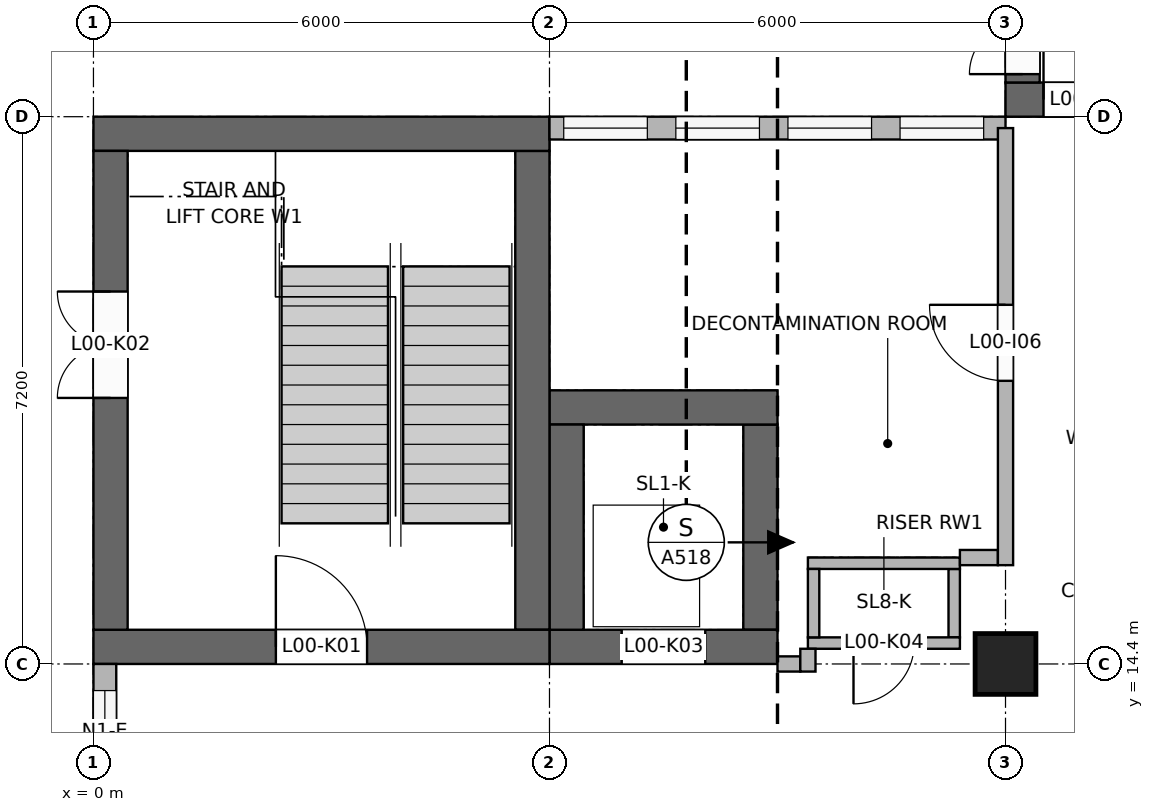
"""IFC4 building model, lengths in metres.
Left out: names, types, materials, properties, quantities, classifications, styles, units other than length and angle.
Written with IfcOpenShell. Run it as: python <this file> out.ifc"""

import sys

from ifc_helpers import new_model, si_unit, direction, frame, frame_2d, origin, origin_2d, place, context, subcontext, project, spatial, rectangle, extrude, element, fill, save


model = new_model("IFC4")
c1 = context("Model", 3, precision=1e-05, world=origin(), true_north=direction((0.0, 1.0)))
c2 = subcontext(c1, "Body", "Model", "MODEL_VIEW")
j1 = project(units=[si_unit("LENGTHUNIT", "METRE"), si_unit("PLANEANGLEUNIT", "RADIAN")], contexts=[c1])
p1 = place(None, origin())
s1 = spatial("IfcSite", under=j1, at=p1, CompositionType="ELEMENT")
p2 = place(p1, origin())
s2 = spatial("IfcBuilding", under=s1, at=p2, CompositionType="ELEMENT")
p3 = place(p2, origin())
s3 = spatial("IfcBuildingStorey", under=s2, at=p3, CompositionType="ELEMENT", Elevation=0.0)
p4 = place(p3, frame((0.0, 14.625, 0.0), z_axis=(0.0, 0.0, 1.0), x_axis=(1.0, 0.0, 0.0)))
e1 = element("IfcWall", 1, at=p4, inside=s3, PredefinedType="SHEAR", context=c2, shape_type="SweptSolid", body=[
    extrude(rectangle(XDim=6.0, YDim=0.45, at=frame_2d((3.0, 0.0))), origin(), (0.0, 0.0, 1.0), 4.0),
])
p5 = place(p4, frame((2.4, 0.0, 0.0)))
e2 = element("IfcOpeningElement", 2, at=p5, cuts=e1, PredefinedType="OPENING", context=c2, shape_type="SweptSolid", body=[
    extrude(rectangle(XDim=1.2, YDim=2.1, at=frame_2d((0.6, 1.05))), frame((0.0, 0.235, 0.0), z_axis=(0.0, -1.0, 0.0), x_axis=(1.0, 0.0, 0.0)), (0.0, 0.0, 1.0), 0.47),
])
p6 = place(p3, frame((0.0, 21.375, 0.0), z_axis=(0.0, 0.0, 1.0), x_axis=(1.0, 0.0, 0.0)))
e3 = element("IfcWall", 3, at=p6, inside=s3, PredefinedType="SHEAR", context=c2, shape_type="SweptSolid", body=[
    extrude(rectangle(XDim=6.0, YDim=0.45, at=frame_2d((3.0, 0.0))), origin(), (0.0, 0.0, 1.0), 4.0),
])
p7 = place(p3, frame((0.225, 14.85, 0.0), z_axis=(0.0, 0.0, 1.0), x_axis=(0.0, 1.0, 0.0)))
e4 = element("IfcWall", 4, at=p7, inside=s3, PredefinedType="SHEAR", context=c2, shape_type="SweptSolid", body=[
    extrude(rectangle(XDim=6.3, YDim=0.45, at=frame_2d((3.15, 0.0))), origin(), (0.0, 0.0, 1.0), 4.0),
])
p8 = place(p7, frame((3.05, 0.0, 0.0)))
e5 = element("IfcOpeningElement", 5, at=p8, cuts=e4, PredefinedType="OPENING", context=c2, shape_type="SweptSolid", body=[
    extrude(rectangle(XDim=1.4, YDim=2.1, at=frame_2d((0.7, 1.05))), frame((0.0, 0.235, 0.0), z_axis=(0.0, -1.0, 0.0), x_axis=(1.0, 0.0, 0.0)), (0.0, 0.0, 1.0), 0.47),
])
p9 = place(p3, frame((5.775, 14.85, 0.0), z_axis=(0.0, 0.0, 1.0), x_axis=(0.0, 1.0, 0.0)))
e6 = element("IfcWall", 6, at=p9, inside=s3, PredefinedType="SHEAR", context=c2, shape_type="SweptSolid", body=[
    extrude(rectangle(XDim=6.3, YDim=0.45, at=frame_2d((3.15, 0.0))), origin(), (0.0, 0.0, 1.0), 4.0),
])
p10 = place(p3, frame((6.0, 14.625, 0.0), z_axis=(0.0, 0.0, 1.0), x_axis=(1.0, 0.0, 0.0)))
e7 = element("IfcWall", 7, at=p10, inside=s3, PredefinedType="SHEAR", context=c2, shape_type="SweptSolid", body=[
    extrude(rectangle(XDim=3.0, YDim=0.45, at=frame_2d((1.5, 0.0))), origin(), (0.0, 0.0, 1.0), 4.2),
])
p11 = place(p10, frame((0.95, 0.0, 0.0)))
e8 = element("IfcOpeningElement", 8, at=p11, cuts=e7, PredefinedType="OPENING", context=c2, shape_type="SweptSolid", body=[
    extrude(rectangle(XDim=1.1, YDim=2.1, at=frame_2d((0.55, 1.05))), frame((0.0, 0.235, 0.0), z_axis=(0.0, -1.0, 0.0), x_axis=(1.0, 0.0, 0.0)), (0.0, 0.0, 1.0), 0.47),
])
p12 = place(p3, frame((6.0, 17.775, 0.0), z_axis=(0.0, 0.0, 1.0), x_axis=(1.0, 0.0, 0.0)))
e9 = element("IfcWall", 9, at=p12, inside=s3, PredefinedType="SHEAR", context=c2, shape_type="SweptSolid", body=[
    extrude(rectangle(XDim=3.0, YDim=0.45, at=frame_2d((1.5, 0.0))), origin(), (0.0, 0.0, 1.0), 4.2),
])
p13 = place(p3, frame((8.775, 14.85, 0.0), z_axis=(0.0, 0.0, 1.0), x_axis=(0.0, 1.0, 0.0)))
e10 = element("IfcWall", 10, at=p13, inside=s3, PredefinedType="SHEAR", context=c2, shape_type="SweptSolid", body=[
    extrude(rectangle(XDim=2.7, YDim=0.45, at=frame_2d((1.35, 0.0))), origin(), (0.0, 0.0, 1.0), 4.2),
])
for number, where, z_axis, x_axis in (
    (11, (6.0, 14.625, -1.7), (0.0, 0.0, 1.0), (1.0, 0.0, 0.0)),
    (12, (6.0, 17.775, -1.7), (0.0, 0.0, 1.0), (1.0, 0.0, 0.0)),
):
    element("IfcWall", number, at=place(p3, frame(where, z_axis=z_axis, x_axis=x_axis)), inside=s3, PredefinedType="SHEAR", context=c2, shape_type="SweptSolid", body=[
        extrude(rectangle(XDim=3.0, YDim=0.45, at=frame_2d((1.5, 0.0))), origin(), (0.0, 0.0, 1.0), 1.7),
    ])
for number, where, z_axis, x_axis in (
    (13, (6.225, 14.85, -1.7), (0.0, 0.0, 1.0), (0.0, 1.0, 0.0)),
    (14, (8.775, 14.85, -1.7), (0.0, 0.0, 1.0), (0.0, 1.0, 0.0)),
):
    element("IfcWall", number, at=place(p3, frame(where, z_axis=z_axis, x_axis=x_axis)), inside=s3, PredefinedType="SHEAR", context=c2, shape_type="SweptSolid", body=[
        extrude(rectangle(XDim=2.7, YDim=0.45, at=frame_2d((1.35, 0.0))), origin(), (0.0, 0.0, 1.0), 1.7),
    ])
p14 = place(p3, frame((12.0, 21.825, 0.0), z_axis=(0.0, 0.0, 1.0), x_axis=(1.0, 0.0, 0.0)))
e15 = element("IfcWall", 15, at=p14, inside=s3, PredefinedType="SHEAR", context=c2, shape_type="SweptSolid", body=[
    extrude(rectangle(XDim=5.4, YDim=0.45, at=frame_2d((2.7, 0.0))), origin(), (0.0, 0.0, 1.0), 4.0),
])
p15 = place(p14, frame((0.5, 0.0, 0.0)))
e16 = element("IfcOpeningElement", 16, at=p15, cuts=e15, PredefinedType="OPENING", context=c2, shape_type="SweptSolid", body=[
    extrude(rectangle(XDim=1.2, YDim=2.1, at=frame_2d((0.6, 1.05))), frame((0.0, 0.235, 0.0), z_axis=(0.0, -1.0, 0.0), x_axis=(1.0, 0.0, 0.0)), (0.0, 0.0, 1.0), 0.47),
])
p16 = place(p3, frame((12.225, 22.05, 0.0), z_axis=(0.0, 0.0, 1.0), x_axis=(0.0, 1.0, 0.0)))
e17 = element("IfcWall", 17, at=p16, inside=s3, PredefinedType="SHEAR", context=c2, shape_type="SweptSolid", body=[
    extrude(rectangle(XDim=6.3, YDim=0.45, at=frame_2d((3.15, 0.0))), origin(), (0.0, 0.0, 1.0), 4.0),
])
p17 = place(p16, frame((0.11, 0.0, 0.0)))
e18 = element("IfcOpeningElement", 18, at=p17, cuts=e17, PredefinedType="OPENING", context=c2, shape_type="SweptSolid", body=[
    extrude(rectangle(XDim=1.4, YDim=2.1, at=frame_2d((0.7, 1.05))), frame((0.0, 0.235, 0.0), z_axis=(0.0, -1.0, 0.0), x_axis=(1.0, 0.0, 0.0)), (0.0, 0.0, 1.0), 0.47),
])
p18 = place(p3, frame((9.4, 14.675, 0.0), z_axis=(0.0, 0.0, 1.0), x_axis=(1.0, 0.0, 0.0)))
e19 = element("IfcWall", 19, at=p18, inside=s3, PredefinedType="SOLIDWALL", context=c2, shape_type="SweptSolid", body=[
    extrude(rectangle(XDim=2.0, YDim=0.15, at=frame_2d((1.0, 0.0))), origin(), (0.0, 0.0, 1.0), 4.2),
])
p19 = place(p18, frame((0.6, 0.0, 0.0)))
e20 = element("IfcOpeningElement", 20, at=p19, cuts=e19, PredefinedType="OPENING", context=c2, shape_type="SweptSolid", body=[
    extrude(rectangle(XDim=0.8, YDim=2.1, at=frame_2d((0.4, 1.05))), frame((0.0, 0.085, 0.0), z_axis=(0.0, -1.0, 0.0), x_axis=(1.0, 0.0, 0.0)), (0.0, 0.0, 1.0), 0.17),
])
p20 = place(p3, frame((9.4, 15.725, 0.0), z_axis=(0.0, 0.0, 1.0), x_axis=(1.0, 0.0, 0.0)))
e21 = element("IfcWall", 21, at=p20, inside=s3, PredefinedType="SOLIDWALL", context=c2, shape_type="SweptSolid", body=[
    extrude(rectangle(XDim=2.0, YDim=0.15, at=frame_2d((1.0, 0.0))), origin(), (0.0, 0.0, 1.0), 4.2),
])
for number, where, z_axis, x_axis in (
    (22, (9.475, 14.75, 0.0), (0.0, 0.0, 1.0), (0.0, 1.0, 0.0)),
    (23, (11.325, 14.75, 0.0), (0.0, 0.0, 1.0), (0.0, 1.0, 0.0)),
):
    element("IfcWall", number, at=place(p3, frame(where, z_axis=z_axis, x_axis=x_axis)), inside=s3, PredefinedType="SOLIDWALL", context=c2, shape_type="SweptSolid", body=[
        extrude(rectangle(XDim=0.9, YDim=0.15, at=frame_2d((0.45, 0.0))), origin(), (0.0, 0.0, 1.0), 4.2),
    ])
p21 = place(p3, frame((12.0, 14.4, -0.25), z_axis=(0.0, 0.0, 1.0), x_axis=(1.0, 0.0, 0.0)))
e24 = element("IfcColumn", 24, at=p21, inside=s3, PredefinedType="COLUMN", context=c2, shape_type="SweptSolid", body=[
    extrude(rectangle(XDim=0.8, YDim=0.8, at=origin_2d()), origin(), (0.0, 0.0, 1.0), 4.25),
])
p22 = place(p3, frame((0.15, 7.6, 0.0), z_axis=(0.0, 0.0, 1.0), x_axis=(0.0, 1.0, 0.0)))
e25 = element("IfcWall", 25, at=p22, inside=s3, PredefinedType="SOLIDWALL", context=c2, shape_type="SweptSolid", body=[
    extrude(rectangle(XDim=6.8, YDim=0.3, at=frame_2d((3.4, 0.0))), origin(), (0.0, 0.0, 1.0), 3.1),
])
p23 = place(p22, frame((0.267, 0.0, 0.9)))
e26 = element("IfcOpeningElement", 26, at=p23, cuts=e25, PredefinedType="OPENING", context=c2, shape_type="SweptSolid", body=[
    extrude(rectangle(XDim=1.1, YDim=1.5, at=frame_2d((0.55, 0.75))), frame((0.0, 0.16, 0.0), z_axis=(0.0, -1.0, 0.0), x_axis=(1.0, 0.0, 0.0)), (0.0, 0.0, 1.0), 0.32),
])
p24 = place(p22, frame((1.9, 0.0, 0.9)))
e27 = element("IfcOpeningElement", 27, at=p24, cuts=e25, PredefinedType="OPENING", context=c2, shape_type="SweptSolid", body=[
    extrude(rectangle(XDim=1.1, YDim=1.5, at=frame_2d((0.55, 0.75))), frame((0.0, 0.16, 0.0), z_axis=(0.0, -1.0, 0.0), x_axis=(1.0, 0.0, 0.0)), (0.0, 0.0, 1.0), 0.32),
])
p25 = place(p22, frame((3.533, 0.0, 0.9)))
e28 = element("IfcOpeningElement", 28, at=p25, cuts=e25, PredefinedType="OPENING", context=c2, shape_type="SweptSolid", body=[
    extrude(rectangle(XDim=1.1, YDim=1.5, at=frame_2d((0.55, 0.75))), frame((0.0, 0.16, 0.0), z_axis=(0.0, -1.0, 0.0), x_axis=(1.0, 0.0, 0.0)), (0.0, 0.0, 1.0), 0.32),
])
p26 = place(p22, frame((5.35, 0.0, 0.9)))
e29 = element("IfcOpeningElement", 29, at=p26, cuts=e25, PredefinedType="OPENING", context=c2, shape_type="SweptSolid", body=[
    extrude(rectangle(XDim=1.1, YDim=1.5, at=frame_2d((0.55, 0.75))), frame((0.0, 0.16, 0.0), z_axis=(0.0, -1.0, 0.0), x_axis=(1.0, 0.0, 0.0)), (0.0, 0.0, 1.0), 0.32),
])
p27 = place(p3, frame((6.0, 21.45, 0.0), z_axis=(0.0, 0.0, 1.0), x_axis=(1.0, 0.0, 0.0)))
e30 = element("IfcWall", 30, at=p27, inside=s3, PredefinedType="SOLIDWALL", context=c2, shape_type="SweptSolid", body=[
    extrude(rectangle(XDim=6.0, YDim=0.3, at=frame_2d((3.0, 0.0))), origin(), (0.0, 0.0, 1.0), 3.1),
])
p28 = place(p27, frame((0.188, 0.0, 0.9)))
e31 = element("IfcOpeningElement", 31, at=p28, cuts=e30, PredefinedType="OPENING", context=c2, shape_type="SweptSolid", body=[
    extrude(rectangle(XDim=1.1, YDim=1.5, at=frame_2d((0.55, 0.75))), frame((0.0, 0.16, 0.0), z_axis=(0.0, -1.0, 0.0), x_axis=(1.0, 0.0, 0.0)), (0.0, 0.0, 1.0), 0.32),
])
p29 = place(p27, frame((1.663, 0.0, 0.9)))
e32 = element("IfcOpeningElement", 32, at=p29, cuts=e30, PredefinedType="OPENING", context=c2, shape_type="SweptSolid", body=[
    extrude(rectangle(XDim=1.1, YDim=1.5, at=frame_2d((0.55, 0.75))), frame((0.0, 0.16, 0.0), z_axis=(0.0, -1.0, 0.0), x_axis=(1.0, 0.0, 0.0)), (0.0, 0.0, 1.0), 0.32),
])
p30 = place(p27, frame((3.137, 0.0, 0.9)))
e33 = element("IfcOpeningElement", 33, at=p30, cuts=e30, PredefinedType="OPENING", context=c2, shape_type="SweptSolid", body=[
    extrude(rectangle(XDim=1.1, YDim=1.5, at=frame_2d((0.55, 0.75))), frame((0.0, 0.16, 0.0), z_axis=(0.0, -1.0, 0.0), x_axis=(1.0, 0.0, 0.0)), (0.0, 0.0, 1.0), 0.32),
])
p31 = place(p27, frame((4.613, 0.0, 0.9)))
e34 = element("IfcOpeningElement", 34, at=p31, cuts=e30, PredefinedType="OPENING", context=c2, shape_type="SweptSolid", body=[
    extrude(rectangle(XDim=1.1, YDim=1.5, at=frame_2d((0.55, 0.75))), frame((0.0, 0.16, 0.0), z_axis=(0.0, -1.0, 0.0), x_axis=(1.0, 0.0, 0.0)), (0.0, 0.0, 1.0), 0.32),
])
p32 = place(p3, frame((9.4, 14.3, 0.0), z_axis=(0.0, 0.0, 1.0), x_axis=(0.0, 1.0, 0.0)))
e35 = element("IfcWall", 35, at=p32, inside=s3, PredefinedType="PARTITIONING", context=c2, shape_type="SweptSolid", body=[
    extrude(rectangle(XDim=0.3, YDim=0.2, at=frame_2d((0.15, 0.0))), origin(), (0.0, 0.0, 1.0), 3.2),
])
p33 = place(p3, frame((12.0, 15.7, 0.0), z_axis=(0.0, 0.0, 1.0), x_axis=(0.0, 1.0, 0.0)))
e36 = element("IfcWall", 36, at=p33, inside=s3, PredefinedType="PARTITIONING", context=c2, shape_type="SweptSolid", body=[
    extrude(rectangle(XDim=5.75, YDim=0.2, at=frame_2d((2.875, 0.0))), origin(), (0.0, 0.0, 1.0), 3.1),
])
p34 = place(p33, frame((2.425, 0.0, 0.0)))
e37 = element("IfcOpeningElement", 37, at=p34, cuts=e36, PredefinedType="OPENING", context=c2, shape_type="SweptSolid", body=[
    extrude(rectangle(XDim=1.0, YDim=2.1, at=frame_2d((0.5, 1.05))), frame((0.0, 0.11, 0.0), z_axis=(0.0, -1.0, 0.0), x_axis=(1.0, 0.0, 0.0)), (0.0, 0.0, 1.0), 0.22),
])
p35 = place(p3, frame((9.0, 14.4, 0.0), z_axis=(0.0, 0.0, 1.0), x_axis=(1.0, 0.0, 0.0)))
e38 = element("IfcWall", 38, at=p35, inside=s3, PredefinedType="PARTITIONING", context=c2, shape_type="SweptSolid", body=[
    extrude(rectangle(XDim=0.3, YDim=0.2, at=frame_2d((0.15, 0.0))), origin(), (0.0, 0.0, 1.0), 3.2),
])
p36 = place(p3, frame((11.4, 15.8, 0.0), z_axis=(0.0, 0.0, 1.0), x_axis=(1.0, 0.0, 0.0)))
e39 = element("IfcWall", 39, at=p36, inside=s3, PredefinedType="PARTITIONING", context=c2, shape_type="SweptSolid", body=[
    extrude(rectangle(XDim=0.5, YDim=0.2, at=frame_2d((0.25, 0.0))), origin(), (0.0, 0.0, 1.0), 3.1),
])
p37 = place(p26, origin())
e40 = element("IfcWindow", 40, at=p37, inside=s3, PartitioningType="SINGLE_PANEL", PredefinedType="WINDOW", context=c2, shape_type="SweptSolid", body=[
    extrude(rectangle(XDim=1.1, YDim=1.5, at=frame_2d((0.55, 0.75))), frame((0.0, 0.03, 0.0), z_axis=(0.0, -1.0, 0.0), x_axis=(1.0, 0.0, 0.0)), (0.0, 0.0, 1.0), 0.06),
])
fill(e29, e40)
p38 = place(p28, origin())
e41 = element("IfcWindow", 41, at=p38, inside=s3, PartitioningType="SINGLE_PANEL", PredefinedType="WINDOW", context=c2, shape_type="SweptSolid", body=[
    extrude(rectangle(XDim=1.1, YDim=1.5, at=frame_2d((0.55, 0.75))), frame((0.0, 0.03, 0.0), z_axis=(0.0, -1.0, 0.0), x_axis=(1.0, 0.0, 0.0)), (0.0, 0.0, 1.0), 0.06),
])
fill(e31, e41)
p39 = place(p29, origin())
e42 = element("IfcWindow", 42, at=p39, inside=s3, PartitioningType="SINGLE_PANEL", PredefinedType="WINDOW", context=c2, shape_type="SweptSolid", body=[
    extrude(rectangle(XDim=1.1, YDim=1.5, at=frame_2d((0.55, 0.75))), frame((0.0, 0.03, 0.0), z_axis=(0.0, -1.0, 0.0), x_axis=(1.0, 0.0, 0.0)), (0.0, 0.0, 1.0), 0.06),
])
fill(e32, e42)
p40 = place(p30, origin())
e43 = element("IfcWindow", 43, at=p40, inside=s3, PartitioningType="SINGLE_PANEL", PredefinedType="WINDOW", context=c2, shape_type="SweptSolid", body=[
    extrude(rectangle(XDim=1.1, YDim=1.5, at=frame_2d((0.55, 0.75))), frame((0.0, 0.03, 0.0), z_axis=(0.0, -1.0, 0.0), x_axis=(1.0, 0.0, 0.0)), (0.0, 0.0, 1.0), 0.06),
])
fill(e33, e43)
p41 = place(p31, origin())
e44 = element("IfcWindow", 44, at=p41, inside=s3, PartitioningType="SINGLE_PANEL", PredefinedType="WINDOW", context=c2, shape_type="SweptSolid", body=[
    extrude(rectangle(XDim=1.1, YDim=1.5, at=frame_2d((0.55, 0.75))), frame((0.0, 0.03, 0.0), z_axis=(0.0, -1.0, 0.0), x_axis=(1.0, 0.0, 0.0)), (0.0, 0.0, 1.0), 0.06),
])
fill(e34, e44)
p42 = place(p5, origin())
e45 = element("IfcDoor", 45, at=p42, inside=s3, OperationType="SINGLE_SWING_LEFT", PredefinedType="DOOR", context=c2, shape_type="SweptSolid", body=[
    extrude(rectangle(XDim=1.2, YDim=2.1, at=frame_2d((0.6, 1.05))), frame((0.0, 0.025, 0.0), z_axis=(0.0, -1.0, 0.0), x_axis=(1.0, 0.0, 0.0)), (0.0, 0.0, 1.0), 0.05),
])
fill(e2, e45)
p43 = place(p8, origin())
e46 = element("IfcDoor", 46, at=p43, inside=s3, OperationType="DOUBLE_DOOR_SINGLE_SWING", PredefinedType="DOOR", context=c2, shape_type="SweptSolid", body=[
    extrude(rectangle(XDim=1.4, YDim=2.1, at=frame_2d((0.7, 1.05))), frame((0.0, 0.025, 0.0), z_axis=(0.0, -1.0, 0.0), x_axis=(1.0, 0.0, 0.0)), (0.0, 0.0, 1.0), 0.05),
])
fill(e5, e46)
p44 = place(p11, origin())
e47 = element("IfcDoor", 47, at=p44, inside=s3, OperationType="DOUBLE_DOOR_SLIDING", PredefinedType="DOOR", context=c2, shape_type="SweptSolid", body=[
    extrude(rectangle(XDim=1.1, YDim=2.1, at=frame_2d((0.55, 1.05))), frame((0.0, 0.025, 0.0), z_axis=(0.0, -1.0, 0.0), x_axis=(1.0, 0.0, 0.0)), (0.0, 0.0, 1.0), 0.05),
])
fill(e8, e47)
p45 = place(p19, frame((0.8, 0.0, 0.0), z_axis=(0.0, 0.0, 1.0), x_axis=(-1.0, 0.0, 0.0)))
e48 = element("IfcDoor", 48, at=p45, inside=s3, OperationType="SINGLE_SWING_RIGHT", PredefinedType="DOOR", context=c2, shape_type="SweptSolid", body=[
    extrude(rectangle(XDim=0.8, YDim=2.1, at=frame_2d((0.4, 1.05))), frame((0.0, 0.025, 0.0), z_axis=(0.0, -1.0, 0.0), x_axis=(1.0, 0.0, 0.0)), (0.0, 0.0, 1.0), 0.05),
])
fill(e20, e48)
p46 = place(p15, origin())
e49 = element("IfcDoor", 49, at=p46, inside=s3, OperationType="SINGLE_SWING_LEFT", PredefinedType="DOOR", context=c2, shape_type="SweptSolid", body=[
    extrude(rectangle(XDim=1.2, YDim=2.1, at=frame_2d((0.6, 1.05))), frame((0.0, 0.025, 0.0), z_axis=(0.0, -1.0, 0.0), x_axis=(1.0, 0.0, 0.0)), (0.0, 0.0, 1.0), 0.05),
])
fill(e16, e49)
p47 = place(p17, origin())
e50 = element("IfcDoor", 50, at=p47, inside=s3, OperationType="DOUBLE_DOOR_SINGLE_SWING", PredefinedType="DOOR", context=c2, shape_type="SweptSolid", body=[
    extrude(rectangle(XDim=1.4, YDim=2.1, at=frame_2d((0.7, 1.05))), frame((0.0, 0.025, 0.0), z_axis=(0.0, -1.0, 0.0), x_axis=(1.0, 0.0, 0.0)), (0.0, 0.0, 1.0), 0.05),
])
fill(e18, e50)
p48 = place(p34, origin())
e51 = element("IfcDoor", 51, at=p48, inside=s3, OperationType="SINGLE_SWING_RIGHT", PredefinedType="DOOR", context=c2, shape_type="SweptSolid", body=[
    extrude(rectangle(XDim=1.0, YDim=2.1, at=frame_2d((0.5, 1.05))), frame((0.0, 0.025, 0.0), z_axis=(0.0, -1.0, 0.0), x_axis=(1.0, 0.0, 0.0)), (0.0, 0.0, 1.0), 0.05),
])
fill(e37, e51)
save(model, sys.argv[1])
